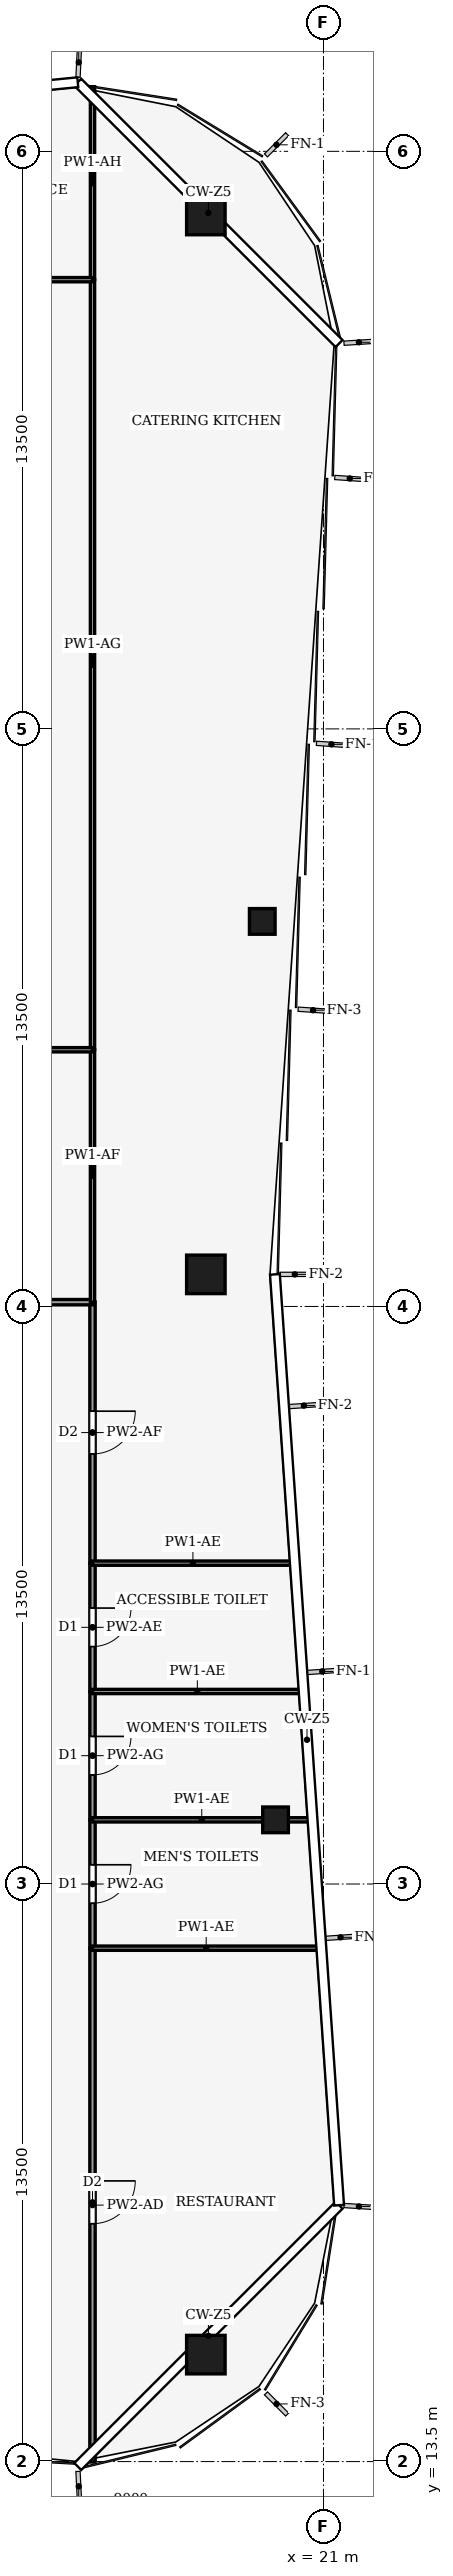
"""IFC4 building model, lengths in metres.
Left out: names, types, materials, properties, quantities, classifications, styles, units other than length and angle.
Written with IfcOpenShell. Run it as: python <this file> out.ifc"""

import sys

from ifc_helpers import new_model, si_unit, direction, frame, frame_2d, origin, origin_2d, place, context, subcontext, project, spatial, rectangle, hollow_rectangle, extrude, element, fill, save


model = new_model("IFC4")
c1 = context("Model", 3, precision=1e-05, world=origin(), true_north=direction((0.0, 1.0)))
c2 = subcontext(c1, "Body", "Model", "MODEL_VIEW")
j1 = project(units=[si_unit("LENGTHUNIT", "METRE"), si_unit("PLANEANGLEUNIT", "RADIAN")], contexts=[c1])
p1 = place(None, origin())
s1 = spatial("IfcSite", under=j1, at=p1, CompositionType="ELEMENT")
p2 = place(p1, origin())
s2 = spatial("IfcBuilding", under=s1, at=p2, CompositionType="ELEMENT")
p3 = place(p2, frame((0.0, 0.0, 330.0)))
s3 = spatial("IfcBuildingStorey", under=s2, at=p3, CompositionType="ELEMENT", Elevation=330.0)
for number, where, z_axis, x_axis in (
    (1, (18.25, 66.0, 0.0), (0.0, 0.0, 1.0), (1.0, 0.0, 0.0)),
    (2, (18.25, 41.25, 0.0), (0.0, 0.0, 1.0), (1.0, 0.0, 0.0)),
    (3, (18.25, 16.0, 0.0), (0.0, 0.0, 1.0), (1.0, 0.0, 0.0)),
):
    element("IfcColumn", number, at=place(p3, frame(where, z_axis=z_axis, x_axis=x_axis)), inside=s3, PredefinedType="COLUMN", context=c2, shape_type="SweptSolid", body=[
        extrude(hollow_rectangle(XDim=0.9, YDim=0.9, WallThickness=0.04, at=origin_2d()), origin(), (0.0, 0.0, 1.0), 4.0),
    ])
for number, where, z_axis, x_axis in (
    (4, (19.879, 28.5, 0.0), (0.0, 0.0, 1.0), (1.0, 0.0, 0.0)),
    (5, (19.569, 49.5, 0.0), (0.0, 0.0, 1.0), (1.0, 0.0, 0.0)),
):
    element("IfcColumn", number, at=place(p3, frame(where, z_axis=z_axis, x_axis=x_axis)), inside=s3, PredefinedType="COLUMN", context=c2, shape_type="SweptSolid", body=[
        extrude(hollow_rectangle(XDim=0.6, YDim=0.6, WallThickness=0.025, at=origin_2d()), origin(), (0.0, 0.0, 1.0), 4.0),
    ])
p4 = place(p3, frame((15.6, 25.5, 0.0), z_axis=(0.0, 0.0, 1.0), x_axis=(0.0, -1.0, 0.0)))
e6 = element("IfcWall", 6, at=p4, inside=s3, PredefinedType="PARTITIONING", context=c2, shape_type="SweptSolid", body=[
    extrude(rectangle(XDim=12.01, YDim=0.125, at=frame_2d((6.005, 0.0))), origin(), (0.0, 0.0, 1.0), 2.88),
])
p5 = place(p4, frame((5.44, 0.0, 0.0)))
e7 = element("IfcOpeningElement", 7, at=p5, cuts=e6, PredefinedType="OPENING", context=c2, shape_type="SweptSolid", body=[
    extrude(rectangle(XDim=1.0, YDim=2.1, at=frame_2d((0.5, 1.05))), frame((0.0, 0.073, 0.0), z_axis=(0.0, -1.0, 0.0), x_axis=(1.0, 0.0, 0.0)), (0.0, 0.0, 1.0), 0.145),
])
p6 = place(p3, frame((15.6, 28.5, 0.0), z_axis=(0.0, 0.0, 1.0), x_axis=(0.0, -1.0, 0.0)))
e8 = element("IfcWall", 8, at=p6, inside=s3, PredefinedType="PARTITIONING", context=c2, shape_type="SweptSolid", body=[
    extrude(rectangle(XDim=3.0, YDim=0.125, at=frame_2d((1.5, 0.0))), origin(), (0.0, 0.0, 1.0), 3.82),
])
p7 = place(p6, frame((1.05, 0.0, 0.0)))
e9 = element("IfcOpeningElement", 9, at=p7, cuts=e8, PredefinedType="OPENING", context=c2, shape_type="SweptSolid", body=[
    extrude(rectangle(XDim=0.9, YDim=2.1, at=frame_2d((0.45, 1.05))), frame((0.0, 0.073, 0.0), z_axis=(0.0, -1.0, 0.0), x_axis=(1.0, 0.0, 0.0)), (0.0, 0.0, 1.0), 0.145),
])
p8 = place(p3, frame((15.6, 31.5, 0.0), z_axis=(0.0, 0.0, 1.0), x_axis=(0.0, -1.0, 0.0)))
e10 = element("IfcWall", 10, at=p8, inside=s3, PredefinedType="PARTITIONING", context=c2, shape_type="SweptSolid", body=[
    extrude(rectangle(XDim=3.0, YDim=0.125, at=frame_2d((1.5, 0.0))), origin(), (0.0, 0.0, 1.0), 3.82),
])
p9 = place(p8, frame((1.05, 0.0, 0.0)))
e11 = element("IfcOpeningElement", 11, at=p9, cuts=e10, PredefinedType="OPENING", context=c2, shape_type="SweptSolid", body=[
    extrude(rectangle(XDim=0.9, YDim=2.1, at=frame_2d((0.45, 1.05))), frame((0.0, 0.073, 0.0), z_axis=(0.0, -1.0, 0.0), x_axis=(1.0, 0.0, 0.0)), (0.0, 0.0, 1.0), 0.145),
])
p10 = place(p3, frame((15.6, 34.5, 0.0), z_axis=(0.0, 0.0, 1.0), x_axis=(0.0, -1.0, 0.0)))
e12 = element("IfcWall", 12, at=p10, inside=s3, PredefinedType="PARTITIONING", context=c2, shape_type="SweptSolid", body=[
    extrude(rectangle(XDim=3.0, YDim=0.125, at=frame_2d((1.5, 0.0))), origin(), (0.0, 0.0, 1.0), 3.49),
])
p11 = place(p10, frame((1.05, 0.0, 0.0)))
e13 = element("IfcOpeningElement", 13, at=p11, cuts=e12, PredefinedType="OPENING", context=c2, shape_type="SweptSolid", body=[
    extrude(rectangle(XDim=0.9, YDim=2.1, at=frame_2d((0.45, 1.05))), frame((0.0, 0.073, 0.0), z_axis=(0.0, -1.0, 0.0), x_axis=(1.0, 0.0, 0.0)), (0.0, 0.0, 1.0), 0.145),
])
p12 = place(p3, frame((15.6, 40.604, 0.0), z_axis=(0.0, 0.0, 1.0), x_axis=(0.0, -1.0, 0.0)))
e14 = element("IfcWall", 14, at=p12, inside=s3, PredefinedType="PARTITIONING", context=c2, shape_type="SweptSolid", body=[
    extrude(rectangle(XDim=6.104, YDim=0.125, at=frame_2d((3.052, 0.0))), origin(), (0.0, 0.0, 1.0), 3.09),
])
p13 = place(p12, frame((2.552, 0.0, 0.0)))
e15 = element("IfcOpeningElement", 15, at=p13, cuts=e14, PredefinedType="OPENING", context=c2, shape_type="SweptSolid", body=[
    extrude(rectangle(XDim=1.0, YDim=2.1, at=frame_2d((0.5, 1.05))), frame((0.0, 0.073, 0.0), z_axis=(0.0, -1.0, 0.0), x_axis=(1.0, 0.0, 0.0)), (0.0, 0.0, 1.0), 0.145),
])
p14 = place(p3, frame((12.0, 40.6, 0.0), z_axis=(0.0, 0.0, 1.0), x_axis=(1.0, 0.0, 0.0)))
e16 = element("IfcWall", 16, at=p14, inside=s3, PredefinedType="PARTITIONING", context=c2, shape_type="SweptSolid", body=[
    extrude(rectangle(XDim=3.6, YDim=0.125, at=frame_2d((1.8, 0.0))), origin(), (0.0, 0.0, 1.0), 3.34),
])
p15 = place(p14, frame((1.3, 0.0, 0.0)))
e17 = element("IfcOpeningElement", 17, at=p15, cuts=e16, PredefinedType="OPENING", context=c2, shape_type="SweptSolid", body=[
    extrude(rectangle(XDim=1.0, YDim=2.1, at=frame_2d((0.5, 1.05))), frame((0.0, 0.073, 0.0), z_axis=(0.0, -1.0, 0.0), x_axis=(1.0, 0.0, 0.0)), (0.0, 0.0, 1.0), 0.145),
])
p16 = place(p3, frame((20.916, 25.5, 0.0), z_axis=(0.0, 0.0, 1.0), x_axis=(-1.0, 0.0, 0.0)))
e18 = element("IfcWall", 18, at=p16, inside=s3, PredefinedType="PARTITIONING", context=c2, shape_type="SweptSolid", body=[
    extrude(rectangle(XDim=5.316, YDim=0.1, at=frame_2d((2.658, 0.0))), origin(), (0.0, 0.0, 1.0), 2.99),
])
p17 = place(p3, frame((20.709, 28.5, 0.0), z_axis=(0.0, 0.0, 1.0), x_axis=(-1.0, 0.0, 0.0)))
e19 = element("IfcWall", 19, at=p17, inside=s3, PredefinedType="PARTITIONING", context=c2, shape_type="SweptSolid", body=[
    extrude(rectangle(XDim=5.109, YDim=0.1, at=frame_2d((2.555, 0.0))), origin(), (0.0, 0.0, 1.0), 2.99),
])
p18 = place(p3, frame((20.502, 31.5, 0.0), z_axis=(0.0, 0.0, 1.0), x_axis=(-1.0, 0.0, 0.0)))
e20 = element("IfcWall", 20, at=p18, inside=s3, PredefinedType="PARTITIONING", context=c2, shape_type="SweptSolid", body=[
    extrude(rectangle(XDim=4.902, YDim=0.1, at=frame_2d((2.451, 0.0))), origin(), (0.0, 0.0, 1.0), 2.99),
])
p19 = place(p3, frame((20.295, 34.5, 0.0), z_axis=(0.0, 0.0, 1.0), x_axis=(-1.0, 0.0, 0.0)))
e21 = element("IfcWall", 21, at=p19, inside=s3, PredefinedType="PARTITIONING", context=c2, shape_type="SweptSolid", body=[
    extrude(rectangle(XDim=4.695, YDim=0.1, at=frame_2d((2.348, 0.0))), origin(), (0.0, 0.0, 1.0), 2.99),
])
p20 = place(p3, frame((15.6, 46.5, 0.0), z_axis=(0.0, 0.0, 1.0), x_axis=(0.0, -1.0, 0.0)))
e22 = element("IfcWall", 22, at=p20, inside=s3, PredefinedType="PARTITIONING", context=c2, shape_type="SweptSolid", body=[
    extrude(rectangle(XDim=5.9, YDim=0.1, at=frame_2d((2.95, 0.0))), origin(), (0.0, 0.0, 1.0), 3.82),
])
p21 = place(p3, frame((15.6, 64.5, 0.0), z_axis=(0.0, 0.0, 1.0), x_axis=(0.0, -1.0, 0.0)))
e23 = element("IfcWall", 23, at=p21, inside=s3, PredefinedType="PARTITIONING", context=c2, shape_type="SweptSolid", body=[
    extrude(rectangle(XDim=18.0, YDim=0.1, at=frame_2d((9.0, 0.0))), origin(), (0.0, 0.0, 1.0), 3.3),
])
p22 = place(p3, frame((15.6, 69.01, 0.0), z_axis=(0.0, 0.0, 1.0), x_axis=(0.0, -1.0, 0.0)))
e24 = element("IfcWall", 24, at=p22, inside=s3, PredefinedType="PARTITIONING", context=c2, shape_type="SweptSolid", body=[
    extrude(rectangle(XDim=4.51, YDim=0.1, at=frame_2d((2.255, 0.0))), origin(), (0.0, 0.0, 1.0), 2.88),
])
p23 = place(p3, frame((15.6, 46.5, 0.0), z_axis=(0.0, 0.0, 1.0), x_axis=(-1.0, 0.0, 0.0)))
e25 = element("IfcWall", 25, at=p23, inside=s3, PredefinedType="PARTITIONING", context=c2, shape_type="SweptSolid", body=[
    extrude(rectangle(XDim=3.604, YDim=0.1, at=frame_2d((1.802, 0.0))), origin(), (0.0, 0.0, 1.0), 3.82),
])
p24 = place(p3, frame((6.0, 64.5, 0.0), z_axis=(0.0, 0.0, 1.0), x_axis=(1.0, 0.0, 0.0)))
e26 = element("IfcWall", 26, at=p24, inside=s3, PredefinedType="PARTITIONING", context=c2, shape_type="SweptSolid", body=[
    extrude(rectangle(XDim=9.6, YDim=0.1, at=frame_2d((4.8, 0.0))), origin(), (0.0, 0.0, 1.0), 3.19),
])
p25 = place(p24, frame((3.1, 0.0, 0.0)))
e27 = element("IfcOpeningElement", 27, at=p25, cuts=e26, PredefinedType="OPENING", context=c2, shape_type="SweptSolid", body=[
    extrude(rectangle(XDim=1.0, YDim=2.1, at=frame_2d((0.5, 1.05))), frame((0.0, 0.06, 0.0), z_axis=(0.0, -1.0, 0.0), x_axis=(1.0, 0.0, 0.0)), (0.0, 0.0, 1.0), 0.12),
])
p26 = place(p5, origin())
e28 = element("IfcDoor", 28, at=p26, inside=s3, OperationType="SINGLE_SWING_LEFT", PredefinedType="DOOR", context=c2, shape_type="SweptSolid", body=[
    extrude(rectangle(XDim=1.0, YDim=2.1, at=frame_2d((0.5, 1.05))), frame((0.0, 0.025, 0.0), z_axis=(0.0, -1.0, 0.0), x_axis=(1.0, 0.0, 0.0)), (0.0, 0.0, 1.0), 0.05),
])
fill(e7, e28)
p27 = place(p7, origin())
e29 = element("IfcDoor", 29, at=p27, inside=s3, OperationType="SINGLE_SWING_LEFT", PredefinedType="DOOR", context=c2, shape_type="SweptSolid", body=[
    extrude(rectangle(XDim=0.9, YDim=2.1, at=frame_2d((0.45, 1.05))), frame((0.0, 0.025, 0.0), z_axis=(0.0, -1.0, 0.0), x_axis=(1.0, 0.0, 0.0)), (0.0, 0.0, 1.0), 0.05),
])
fill(e9, e29)
p28 = place(p9, origin())
e30 = element("IfcDoor", 30, at=p28, inside=s3, OperationType="SINGLE_SWING_RIGHT", PredefinedType="DOOR", context=c2, shape_type="SweptSolid", body=[
    extrude(rectangle(XDim=0.9, YDim=2.1, at=frame_2d((0.45, 1.05))), frame((0.0, 0.025, 0.0), z_axis=(0.0, -1.0, 0.0), x_axis=(1.0, 0.0, 0.0)), (0.0, 0.0, 1.0), 0.05),
])
fill(e11, e30)
p29 = place(p11, origin())
e31 = element("IfcDoor", 31, at=p29, inside=s3, OperationType="SINGLE_SWING_LEFT", PredefinedType="DOOR", context=c2, shape_type="SweptSolid", body=[
    extrude(rectangle(XDim=0.9, YDim=2.1, at=frame_2d((0.45, 1.05))), frame((0.0, 0.025, 0.0), z_axis=(0.0, -1.0, 0.0), x_axis=(1.0, 0.0, 0.0)), (0.0, 0.0, 1.0), 0.05),
])
fill(e13, e31)
p30 = place(p13, origin())
e32 = element("IfcDoor", 32, at=p30, inside=s3, OperationType="SINGLE_SWING_RIGHT", PredefinedType="DOOR", context=c2, shape_type="SweptSolid", body=[
    extrude(rectangle(XDim=1.0, YDim=2.1, at=frame_2d((0.5, 1.05))), frame((0.0, 0.025, 0.0), z_axis=(0.0, -1.0, 0.0), x_axis=(1.0, 0.0, 0.0)), (0.0, 0.0, 1.0), 0.05),
])
fill(e15, e32)
save(model, sys.argv[1])
